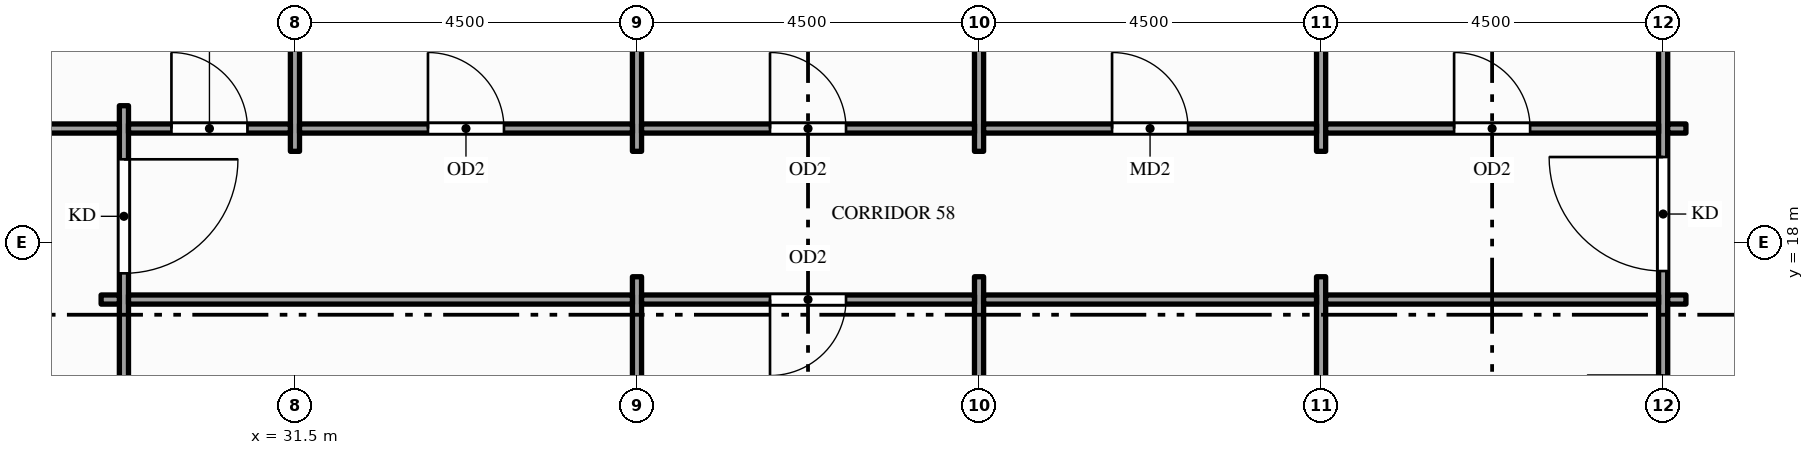
"""IFC4 building model, lengths in metres.
Left out: names, types, materials, properties, quantities, classifications, styles, units other than length and angle.
Written with IfcOpenShell. Run it as: python <this file> out.ifc"""

import sys

from ifc_helpers import new_model, si_unit, direction, frame, frame_2d, origin, place, context, subcontext, project, spatial, rectangle, extrude, element, fill, save


model = new_model("IFC4")
c1 = context("Model", 3, precision=1e-05, world=origin(), true_north=direction((0.0, 1.0)))
c2 = subcontext(c1, "Body", "Model", "MODEL_VIEW")
j1 = project(units=[si_unit("LENGTHUNIT", "METRE"), si_unit("PLANEANGLEUNIT", "RADIAN")], contexts=[c1])
p1 = place(None, origin())
s1 = spatial("IfcSite", under=j1, at=p1, CompositionType="ELEMENT")
p2 = place(p1, origin())
s2 = spatial("IfcBuilding", under=s1, at=p2, CompositionType="ELEMENT")
p3 = place(p2, frame((0.0, 0.0, 183.0)))
s3 = spatial("IfcBuildingStorey", under=s2, at=p3, CompositionType="ELEMENT", Elevation=183.0)
p4 = place(p3, frame((29.25, 5.7, 0.0), z_axis=(0.0, 0.0, 1.0), x_axis=(0.0, 1.0, 0.0)))
e1 = element("IfcWall", 1, at=p4, inside=s3, PredefinedType="PARTITIONING", context=c2, shape_type="SweptSolid", body=[
    extrude(rectangle(XDim=14.1, YDim=0.12, at=frame_2d((7.05, 0.0))), origin(), (0.0, 0.0, 1.0), 2.77),
])
p5 = place(p4, frame((0.705, 0.0, 0.0)))
e2 = element("IfcOpeningElement", 2, at=p5, cuts=e1, PredefinedType="OPENING", context=c2, shape_type="SweptSolid", body=[
    extrude(rectangle(XDim=1.5, YDim=2.1, at=frame_2d((0.75, 1.05))), frame((0.0, 0.07, 0.0), z_axis=(0.0, -1.0, 0.0), x_axis=(1.0, 0.0, 0.0)), (0.0, 0.0, 1.0), 0.14),
])
p6 = place(p4, frame((11.895, 0.0, 0.0)))
e3 = element("IfcOpeningElement", 3, at=p6, cuts=e1, PredefinedType="OPENING", context=c2, shape_type="SweptSolid", body=[
    extrude(rectangle(XDim=1.5, YDim=2.1, at=frame_2d((0.75, 1.05))), frame((0.0, 0.07, 0.0), z_axis=(0.0, -1.0, 0.0), x_axis=(1.0, 0.0, 0.0)), (0.0, 0.0, 1.0), 0.14),
])
p7 = place(p3, frame((31.5, 19.2, 0.0), z_axis=(0.0, 0.0, 1.0), x_axis=(0.0, 1.0, 0.0)))
e4 = element("IfcWall", 4, at=p7, inside=s3, PredefinedType="PARTITIONING", context=c2, shape_type="SweptSolid", body=[
    extrude(rectangle(XDim=4.65, YDim=0.12, at=frame_2d((2.325, 0.0))), origin(), (0.0, 0.0, 1.0), 2.35),
])
p8 = place(p3, frame((36.0, 7.95, 0.0), z_axis=(0.0, 0.0, 1.0), x_axis=(0.0, 1.0, 0.0)))
e5 = element("IfcWall", 5, at=p8, inside=s3, PredefinedType="PARTITIONING", context=c2, shape_type="SweptSolid", body=[
    extrude(rectangle(XDim=9.6, YDim=0.12, at=frame_2d((4.8, 0.0))), origin(), (0.0, 0.0, 1.0), 2.77),
])
p9 = place(p3, frame((36.0, 19.2, 0.0), z_axis=(0.0, 0.0, 1.0), x_axis=(0.0, 1.0, 0.0)))
e6 = element("IfcWall", 6, at=p9, inside=s3, PredefinedType="PARTITIONING", context=c2, shape_type="SweptSolid", body=[
    extrude(rectangle(XDim=4.65, YDim=0.12, at=frame_2d((2.325, 0.0))), origin(), (0.0, 0.0, 1.0), 2.35),
])
p10 = place(p3, frame((40.5, 7.95, 0.0), z_axis=(0.0, 0.0, 1.0), x_axis=(0.0, 1.0, 0.0)))
e7 = element("IfcWall", 7, at=p10, inside=s3, PredefinedType="PARTITIONING", context=c2, shape_type="SweptSolid", body=[
    extrude(rectangle(XDim=9.6, YDim=0.12, at=frame_2d((4.8, 0.0))), origin(), (0.0, 0.0, 1.0), 2.77),
])
p11 = place(p3, frame((40.5, 19.2, 0.0), z_axis=(0.0, 0.0, 1.0), x_axis=(0.0, 1.0, 0.0)))
e8 = element("IfcWall", 8, at=p11, inside=s3, PredefinedType="PARTITIONING", context=c2, shape_type="SweptSolid", body=[
    extrude(rectangle(XDim=4.65, YDim=0.12, at=frame_2d((2.325, 0.0))), origin(), (0.0, 0.0, 1.0), 2.35),
])
p12 = place(p3, frame((45.0, 7.95, 0.0), z_axis=(0.0, 0.0, 1.0), x_axis=(0.0, 1.0, 0.0)))
e9 = element("IfcWall", 9, at=p12, inside=s3, PredefinedType="PARTITIONING", context=c2, shape_type="SweptSolid", body=[
    extrude(rectangle(XDim=9.6, YDim=0.12, at=frame_2d((4.8, 0.0))), origin(), (0.0, 0.0, 1.0), 2.77),
])
p13 = place(p3, frame((45.0, 19.2, 0.0), z_axis=(0.0, 0.0, 1.0), x_axis=(0.0, 1.0, 0.0)))
e10 = element("IfcWall", 10, at=p13, inside=s3, PredefinedType="PARTITIONING", context=c2, shape_type="SweptSolid", body=[
    extrude(rectangle(XDim=4.65, YDim=0.12, at=frame_2d((2.325, 0.0))), origin(), (0.0, 0.0, 1.0), 2.35),
])
p14 = place(p3, frame((49.5, 1.65, 0.0), z_axis=(0.0, 0.0, 1.0), x_axis=(0.0, 1.0, 0.0)))
e11 = element("IfcWall", 11, at=p14, inside=s3, PredefinedType="PARTITIONING", context=c2, shape_type="SweptSolid", body=[
    extrude(rectangle(XDim=22.2, YDim=0.12, at=frame_2d((11.1, 0.0))), origin(), (0.0, 0.0, 1.0), 2.35),
])
p15 = place(p14, frame((4.725, 0.0, 0.0)))
e12 = element("IfcOpeningElement", 12, at=p15, cuts=e11, PredefinedType="OPENING", context=c2, shape_type="SweptSolid", body=[
    extrude(rectangle(XDim=1.5, YDim=2.1, at=frame_2d((0.75, 1.05))), frame((0.0, 0.07, 0.0), z_axis=(0.0, -1.0, 0.0), x_axis=(1.0, 0.0, 0.0)), (0.0, 0.0, 1.0), 0.14),
])
p16 = place(p14, frame((15.975, 0.0, 0.0)))
e13 = element("IfcOpeningElement", 13, at=p16, cuts=e11, PredefinedType="OPENING", context=c2, shape_type="SweptSolid", body=[
    extrude(rectangle(XDim=1.5, YDim=2.1, at=frame_2d((0.75, 1.05))), frame((0.0, 0.07, 0.0), z_axis=(0.0, -1.0, 0.0), x_axis=(1.0, 0.0, 0.0)), (0.0, 0.0, 1.0), 0.14),
])
p17 = place(p14, frame((7.6, 0.0, 0.0)))
e14 = element("IfcOpeningElement", 14, at=p17, cuts=e11, PredefinedType="OPENING", context=c2, shape_type="SweptSolid", body=[
    extrude(rectangle(XDim=0.9, YDim=2.1, at=frame_2d((0.45, 1.05))), frame((0.0, 0.07, 0.0), z_axis=(0.0, -1.0, 0.0), x_axis=(1.0, 0.0, 0.0)), (0.0, 0.0, 1.0), 0.14),
])
p18 = place(p14, frame((10.65, 0.0, 0.0)))
e15 = element("IfcOpeningElement", 15, at=p18, cuts=e11, PredefinedType="OPENING", context=c2, shape_type="SweptSolid", body=[
    extrude(rectangle(XDim=0.9, YDim=2.1, at=frame_2d((0.45, 1.05))), frame((0.0, 0.07, 0.0), z_axis=(0.0, -1.0, 0.0), x_axis=(1.0, 0.0, 0.0)), (0.0, 0.0, 1.0), 0.14),
])
p19 = place(p14, frame((13.6, 0.0, 0.0)))
e16 = element("IfcOpeningElement", 16, at=p19, cuts=e11, PredefinedType="OPENING", context=c2, shape_type="SweptSolid", body=[
    extrude(rectangle(XDim=1.0, YDim=2.1, at=frame_2d((0.5, 1.05))), frame((0.0, 0.07, 0.0), z_axis=(0.0, -1.0, 0.0), x_axis=(1.0, 0.0, 0.0)), (0.0, 0.0, 1.0), 0.14),
])
p20 = place(p3, frame((28.95, 17.25, 0.0), z_axis=(0.0, 0.0, 1.0), x_axis=(1.0, 0.0, 0.0)))
e17 = element("IfcWall", 17, at=p20, inside=s3, PredefinedType="PARTITIONING", context=c2, shape_type="SweptSolid", body=[
    extrude(rectangle(XDim=0.24, YDim=0.12, at=frame_2d((0.12, 0.0))), origin(), (0.0, 0.0, 1.0), 2.77),
])
p21 = place(p3, frame((29.31, 17.25, 0.0), z_axis=(0.0, 0.0, 1.0), x_axis=(1.0, 0.0, 0.0)))
e18 = element("IfcWall", 18, at=p21, inside=s3, PredefinedType="PARTITIONING", context=c2, shape_type="SweptSolid", body=[
    extrude(rectangle(XDim=6.63, YDim=0.12, at=frame_2d((3.315, 0.0))), origin(), (0.0, 0.0, 1.0), 2.77),
])
p22 = place(p3, frame((36.06, 17.25, 0.0), z_axis=(0.0, 0.0, 1.0), x_axis=(1.0, 0.0, 0.0)))
e19 = element("IfcWall", 19, at=p22, inside=s3, PredefinedType="PARTITIONING", context=c2, shape_type="SweptSolid", body=[
    extrude(rectangle(XDim=4.38, YDim=0.12, at=frame_2d((2.19, 0.0))), origin(), (0.0, 0.0, 1.0), 2.77),
])
p23 = place(p22, frame((1.69, 0.0, 0.0)))
e20 = element("IfcOpeningElement", 20, at=p23, cuts=e19, PredefinedType="OPENING", context=c2, shape_type="SweptSolid", body=[
    extrude(rectangle(XDim=1.0, YDim=2.1, at=frame_2d((0.5, 1.05))), frame((0.0, 0.07, 0.0), z_axis=(0.0, -1.0, 0.0), x_axis=(1.0, 0.0, 0.0)), (0.0, 0.0, 1.0), 0.14),
])
for number, where, z_axis, x_axis in (
    (21, (40.56, 17.25, 0.0), (0.0, 0.0, 1.0), (1.0, 0.0, 0.0)),
    (22, (45.06, 17.25, 0.0), (0.0, 0.0, 1.0), (1.0, 0.0, 0.0)),
):
    element("IfcWall", number, at=place(p3, frame(where, z_axis=z_axis, x_axis=x_axis)), inside=s3, PredefinedType="PARTITIONING", context=c2, shape_type="SweptSolid", body=[
        extrude(rectangle(XDim=4.38, YDim=0.12, at=frame_2d((2.19, 0.0))), origin(), (0.0, 0.0, 1.0), 2.77),
    ])
p24 = place(p3, frame((49.56, 17.25, 0.0), z_axis=(0.0, 0.0, 1.0), x_axis=(1.0, 0.0, 0.0)))
e23 = element("IfcWall", 23, at=p24, inside=s3, PredefinedType="PARTITIONING", context=c2, shape_type="SweptSolid", body=[
    extrude(rectangle(XDim=0.24, YDim=0.12, at=frame_2d((0.12, 0.0))), origin(), (0.0, 0.0, 1.0), 2.77),
])
p25 = place(p3, frame((27.06, 19.5, 0.0), z_axis=(0.0, 0.0, 1.0), x_axis=(1.0, 0.0, 0.0)))
e24 = element("IfcWall", 24, at=p25, inside=s3, PredefinedType="PARTITIONING", context=c2, shape_type="SweptSolid", body=[
    extrude(rectangle(XDim=2.13, YDim=0.12, at=frame_2d((1.065, 0.0))), origin(), (0.0, 0.0, 1.0), 2.77),
])
p26 = place(p3, frame((29.31, 19.5, 0.0), z_axis=(0.0, 0.0, 1.0), x_axis=(1.0, 0.0, 0.0)))
e25 = element("IfcWall", 25, at=p26, inside=s3, PredefinedType="PARTITIONING", context=c2, shape_type="SweptSolid", body=[
    extrude(rectangle(XDim=2.13, YDim=0.12, at=frame_2d((1.065, 0.0))), origin(), (0.0, 0.0, 1.0), 2.77),
])
p27 = place(p26, frame((0.565, 0.0, 0.0)))
e26 = element("IfcOpeningElement", 26, at=p27, cuts=e25, PredefinedType="OPENING", context=c2, shape_type="SweptSolid", body=[
    extrude(rectangle(XDim=1.0, YDim=2.1, at=frame_2d((0.5, 1.05))), frame((0.0, 0.07, 0.0), z_axis=(0.0, -1.0, 0.0), x_axis=(1.0, 0.0, 0.0)), (0.0, 0.0, 1.0), 0.14),
])
p28 = place(p3, frame((31.56, 19.5, 0.0), z_axis=(0.0, 0.0, 1.0), x_axis=(1.0, 0.0, 0.0)))
e27 = element("IfcWall", 27, at=p28, inside=s3, PredefinedType="PARTITIONING", context=c2, shape_type="SweptSolid", body=[
    extrude(rectangle(XDim=4.38, YDim=0.12, at=frame_2d((2.19, 0.0))), origin(), (0.0, 0.0, 1.0), 2.77),
])
p29 = place(p28, frame((1.69, 0.0, 0.0)))
e28 = element("IfcOpeningElement", 28, at=p29, cuts=e27, PredefinedType="OPENING", context=c2, shape_type="SweptSolid", body=[
    extrude(rectangle(XDim=1.0, YDim=2.1, at=frame_2d((0.5, 1.05))), frame((0.0, 0.07, 0.0), z_axis=(0.0, -1.0, 0.0), x_axis=(1.0, 0.0, 0.0)), (0.0, 0.0, 1.0), 0.14),
])
p30 = place(p3, frame((36.06, 19.5, 0.0), z_axis=(0.0, 0.0, 1.0), x_axis=(1.0, 0.0, 0.0)))
e29 = element("IfcWall", 29, at=p30, inside=s3, PredefinedType="PARTITIONING", context=c2, shape_type="SweptSolid", body=[
    extrude(rectangle(XDim=4.38, YDim=0.12, at=frame_2d((2.19, 0.0))), origin(), (0.0, 0.0, 1.0), 2.77),
])
p31 = place(p30, frame((1.69, 0.0, 0.0)))
e30 = element("IfcOpeningElement", 30, at=p31, cuts=e29, PredefinedType="OPENING", context=c2, shape_type="SweptSolid", body=[
    extrude(rectangle(XDim=1.0, YDim=2.1, at=frame_2d((0.5, 1.05))), frame((0.0, 0.07, 0.0), z_axis=(0.0, -1.0, 0.0), x_axis=(1.0, 0.0, 0.0)), (0.0, 0.0, 1.0), 0.14),
])
p32 = place(p3, frame((40.56, 19.5, 0.0), z_axis=(0.0, 0.0, 1.0), x_axis=(1.0, 0.0, 0.0)))
e31 = element("IfcWall", 31, at=p32, inside=s3, PredefinedType="PARTITIONING", context=c2, shape_type="SweptSolid", body=[
    extrude(rectangle(XDim=4.38, YDim=0.12, at=frame_2d((2.19, 0.0))), origin(), (0.0, 0.0, 1.0), 2.77),
])
p33 = place(p32, frame((1.69, 0.0, 0.0)))
e32 = element("IfcOpeningElement", 32, at=p33, cuts=e31, PredefinedType="OPENING", context=c2, shape_type="SweptSolid", body=[
    extrude(rectangle(XDim=1.0, YDim=2.1, at=frame_2d((0.5, 1.05))), frame((0.0, 0.07, 0.0), z_axis=(0.0, -1.0, 0.0), x_axis=(1.0, 0.0, 0.0)), (0.0, 0.0, 1.0), 0.14),
])
p34 = place(p3, frame((45.06, 19.5, 0.0), z_axis=(0.0, 0.0, 1.0), x_axis=(1.0, 0.0, 0.0)))
e33 = element("IfcWall", 33, at=p34, inside=s3, PredefinedType="PARTITIONING", context=c2, shape_type="SweptSolid", body=[
    extrude(rectangle(XDim=4.38, YDim=0.12, at=frame_2d((2.19, 0.0))), origin(), (0.0, 0.0, 1.0), 2.77),
])
p35 = place(p34, frame((1.69, 0.0, 0.0)))
e34 = element("IfcOpeningElement", 34, at=p35, cuts=e33, PredefinedType="OPENING", context=c2, shape_type="SweptSolid", body=[
    extrude(rectangle(XDim=1.0, YDim=2.1, at=frame_2d((0.5, 1.05))), frame((0.0, 0.07, 0.0), z_axis=(0.0, -1.0, 0.0), x_axis=(1.0, 0.0, 0.0)), (0.0, 0.0, 1.0), 0.14),
])
p36 = place(p3, frame((49.56, 19.5, 0.0), z_axis=(0.0, 0.0, 1.0), x_axis=(1.0, 0.0, 0.0)))
e35 = element("IfcWall", 35, at=p36, inside=s3, PredefinedType="PARTITIONING", context=c2, shape_type="SweptSolid", body=[
    extrude(rectangle(XDim=0.24, YDim=0.12, at=frame_2d((0.12, 0.0))), origin(), (0.0, 0.0, 1.0), 2.77),
])
p37 = place(p6, origin())
e36 = element("IfcDoor", 36, at=p37, inside=s3, OperationType="SINGLE_SWING_RIGHT", PredefinedType="DOOR", context=c2, shape_type="SweptSolid", body=[
    extrude(rectangle(XDim=1.5, YDim=2.1, at=frame_2d((0.75, 1.05))), frame((0.0, 0.025, 0.0), z_axis=(0.0, -1.0, 0.0), x_axis=(1.0, 0.0, 0.0)), (0.0, 0.0, 1.0), 0.05),
])
fill(e3, e36)
p38 = place(p16, origin())
e37 = element("IfcDoor", 37, at=p38, inside=s3, OperationType="SINGLE_SWING_RIGHT", PredefinedType="DOOR", context=c2, shape_type="SweptSolid", body=[
    extrude(rectangle(XDim=1.5, YDim=2.1, at=frame_2d((0.75, 1.05))), frame((0.0, 0.025, 0.0), z_axis=(0.0, -1.0, 0.0), x_axis=(1.0, 0.0, 0.0)), (0.0, 0.0, 1.0), 0.05),
])
fill(e13, e37)
p39 = place(p23, origin())
e38 = element("IfcDoor", 38, at=p39, inside=s3, OperationType="SINGLE_SWING_LEFT", PredefinedType="DOOR", context=c2, shape_type="SweptSolid", body=[
    extrude(rectangle(XDim=1.0, YDim=2.1, at=frame_2d((0.5, 1.05))), frame((0.0, 0.025, 0.0), z_axis=(0.0, -1.0, 0.0), x_axis=(1.0, 0.0, 0.0)), (0.0, 0.0, 1.0), 0.05),
])
fill(e20, e38)
p40 = place(p27, origin())
e39 = element("IfcDoor", 39, at=p40, inside=s3, OperationType="SINGLE_SWING_LEFT", PredefinedType="DOOR", context=c2, shape_type="SweptSolid", body=[
    extrude(rectangle(XDim=1.0, YDim=2.1, at=frame_2d((0.5, 1.05))), frame((0.0, 0.025, 0.0), z_axis=(0.0, -1.0, 0.0), x_axis=(1.0, 0.0, 0.0)), (0.0, 0.0, 1.0), 0.05),
])
fill(e26, e39)
p41 = place(p29, origin())
e40 = element("IfcDoor", 40, at=p41, inside=s3, OperationType="SINGLE_SWING_LEFT", PredefinedType="DOOR", context=c2, shape_type="SweptSolid", body=[
    extrude(rectangle(XDim=1.0, YDim=2.1, at=frame_2d((0.5, 1.05))), frame((0.0, 0.025, 0.0), z_axis=(0.0, -1.0, 0.0), x_axis=(1.0, 0.0, 0.0)), (0.0, 0.0, 1.0), 0.05),
])
fill(e28, e40)
p42 = place(p31, origin())
e41 = element("IfcDoor", 41, at=p42, inside=s3, OperationType="SINGLE_SWING_LEFT", PredefinedType="DOOR", context=c2, shape_type="SweptSolid", body=[
    extrude(rectangle(XDim=1.0, YDim=2.1, at=frame_2d((0.5, 1.05))), frame((0.0, 0.025, 0.0), z_axis=(0.0, -1.0, 0.0), x_axis=(1.0, 0.0, 0.0)), (0.0, 0.0, 1.0), 0.05),
])
fill(e30, e41)
p43 = place(p33, origin())
e42 = element("IfcDoor", 42, at=p43, inside=s3, OperationType="SINGLE_SWING_LEFT", PredefinedType="DOOR", context=c2, shape_type="SweptSolid", body=[
    extrude(rectangle(XDim=1.0, YDim=2.1, at=frame_2d((0.5, 1.05))), frame((0.0, 0.025, 0.0), z_axis=(0.0, -1.0, 0.0), x_axis=(1.0, 0.0, 0.0)), (0.0, 0.0, 1.0), 0.05),
])
fill(e32, e42)
p44 = place(p35, origin())
e43 = element("IfcDoor", 43, at=p44, inside=s3, OperationType="SINGLE_SWING_LEFT", PredefinedType="DOOR", context=c2, shape_type="SweptSolid", body=[
    extrude(rectangle(XDim=1.0, YDim=2.1, at=frame_2d((0.5, 1.05))), frame((0.0, 0.025, 0.0), z_axis=(0.0, -1.0, 0.0), x_axis=(1.0, 0.0, 0.0)), (0.0, 0.0, 1.0), 0.05),
])
fill(e34, e43)
save(model, sys.argv[1])
